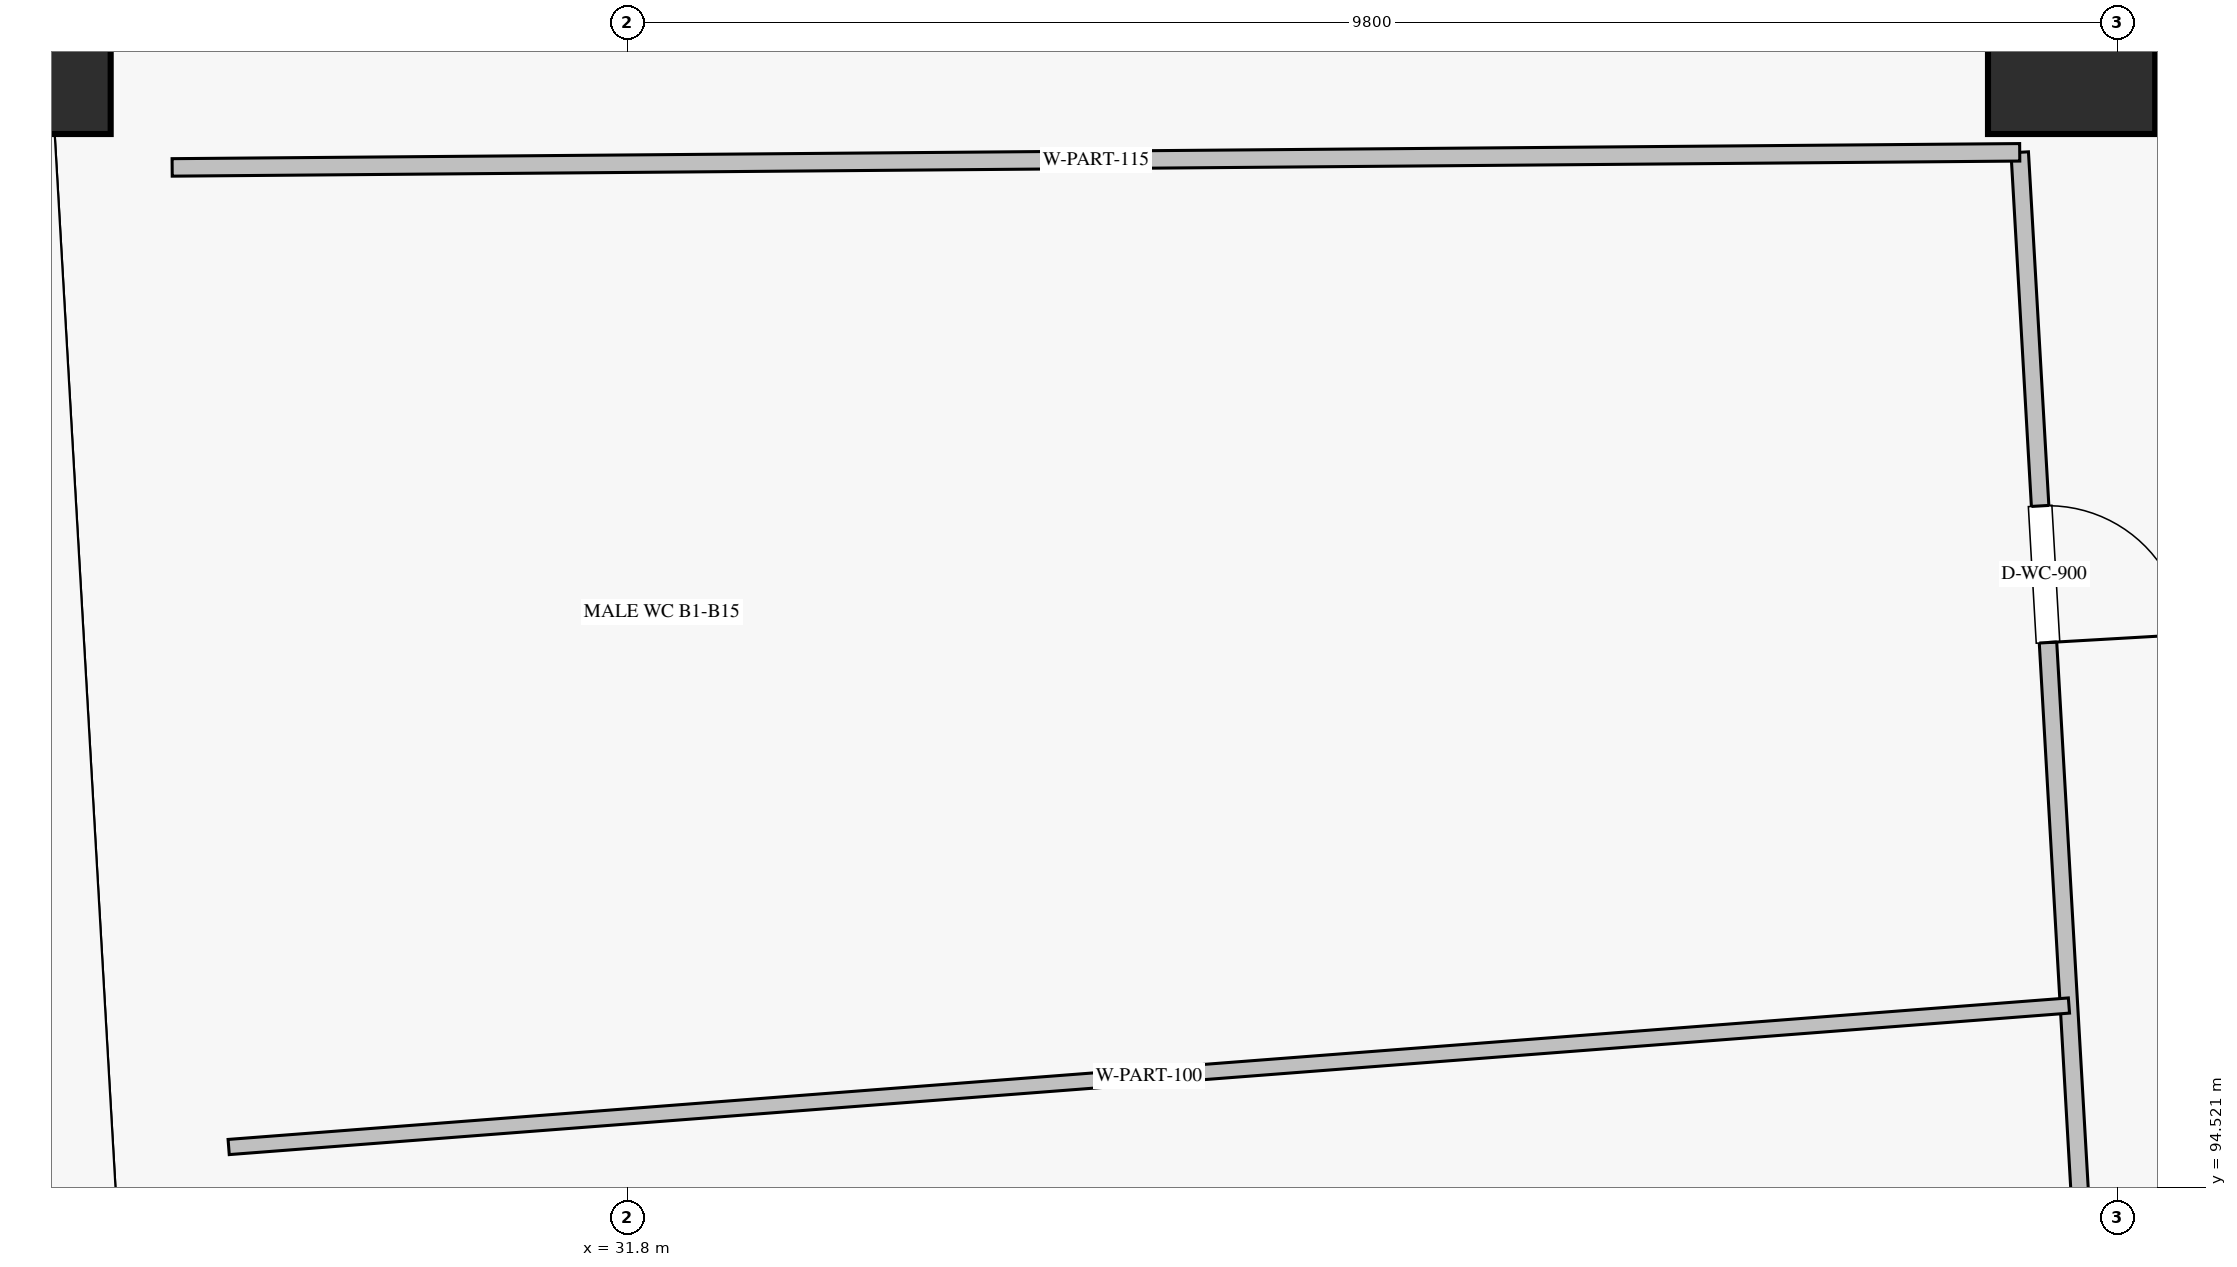
"""IFC4 building model, lengths in metres.
Left out: names, types, materials, properties, quantities, classifications, styles, units other than length and angle.
Written with IfcOpenShell. Run it as: python <this file> out.ifc"""

import sys

from ifc_helpers import new_model, si_unit, direction, frame, frame_2d, origin, origin_2d, place, context, subcontext, project, spatial, rectangle, extrude, element, fill, save


model = new_model("IFC4")
c1 = context("Model", 3, precision=1e-05, world=origin(), true_north=direction((0.0, 1.0)))
c2 = subcontext(c1, "Body", "Model", "MODEL_VIEW")
j1 = project(units=[si_unit("LENGTHUNIT", "METRE"), si_unit("PLANEANGLEUNIT", "RADIAN")], contexts=[c1])
p1 = place(None, origin())
s1 = spatial("IfcSite", under=j1, at=p1, CompositionType="ELEMENT")
p2 = place(p1, origin())
s2 = spatial("IfcBuilding", under=s1, at=p2, CompositionType="ELEMENT")
p3 = place(p2, frame((0.0, 0.0, -5.44)))
s3 = spatial("IfcBuildingStorey", under=s2, at=p3, CompositionType="ELEMENT", Elevation=-5.44)
p4 = place(p3, frame((41.3, 102.0, 0.0), z_axis=(0.0, 0.0, 1.0), x_axis=(-1.0, 0.0, 0.0)))
e1 = element("IfcColumn", 1, at=p4, inside=s3, PredefinedType="COLUMN", context=c2, shape_type="SweptSolid", body=[
    extrude(rectangle(XDim=1.1, YDim=1.1, at=origin_2d()), origin(), (0.0, 0.0, 1.0), 5.44),
])
p5 = place(p3, frame((28.0, 102.0, 0.0), z_axis=(0.0, 0.0, 1.0), x_axis=(-1.0, 0.0, 0.0)))
e2 = element("IfcColumn", 2, at=p5, inside=s3, PredefinedType="COLUMN", context=c2, shape_type="SweptSolid", body=[
    extrude(rectangle(XDim=0.8, YDim=1.1, at=origin_2d()), origin(), (0.0, 0.0, 1.0), 5.44),
])
p6 = place(p3, frame((40.959, 101.33, 0.0), z_axis=(0.0, 0.0, 1.0), x_axis=(0.057603503798, -0.998339539611, 0.0)))
e3 = element("IfcWall", 3, at=p6, inside=s3, PredefinedType="PARTITIONING", context=c2, shape_type="SweptSolid", body=[
    extrude(rectangle(XDim=15.444, YDim=0.115, at=frame_2d((7.722, 0.0))), origin(), (0.0, 0.0, 1.0), 4.46),
])
p7 = place(p6, frame((2.33, 0.0, 0.0)))
e4 = element("IfcOpeningElement", 4, at=p7, cuts=e3, PredefinedType="OPENING", context=c2, shape_type="SweptSolid", body=[
    extrude(rectangle(XDim=0.9, YDim=2.1, at=frame_2d((0.45, 1.05))), frame((0.0, 0.067, 0.0), z_axis=(0.0, -1.0, 0.0), x_axis=(1.0, 0.0, 0.0)), (0.0, 0.0, 1.0), 0.135),
])
p8 = place(p6, frame((7.89, 0.0, 0.0)))
e5 = element("IfcOpeningElement", 5, at=p8, cuts=e3, PredefinedType="OPENING", context=c2, shape_type="SweptSolid", body=[
    extrude(rectangle(XDim=0.9, YDim=2.1, at=frame_2d((0.45, 1.05))), frame((0.0, 0.067, 0.0), z_axis=(0.0, -1.0, 0.0), x_axis=(1.0, 0.0, 0.0)), (0.0, 0.0, 1.0), 0.135),
])
p9 = place(p6, frame((12.757, 0.0, 0.0)))
e6 = element("IfcOpeningElement", 6, at=p9, cuts=e3, PredefinedType="OPENING", context=c2, shape_type="SweptSolid", body=[
    extrude(rectangle(XDim=1.05, YDim=2.1, at=frame_2d((0.525, 1.05))), frame((0.0, 0.067, 0.0), z_axis=(0.0, -1.0, 0.0), x_axis=(1.0, 0.0, 0.0)), (0.0, 0.0, 1.0), 0.135),
])
p10 = place(p3, frame((40.959, 101.33, 0.0), z_axis=(0.0, 0.0, 1.0), x_axis=(-0.999966583768, -0.008175044183, 0.0)))
e7 = element("IfcWall", 7, at=p10, inside=s3, PredefinedType="PARTITIONING", context=c2, shape_type="SweptSolid", body=[
    extrude(rectangle(XDim=12.155, YDim=0.115, at=frame_2d((6.077, 0.0))), origin(), (0.0, 0.0, 1.0), 4.46),
])
p11 = place(p3, frame((41.282, 95.717, 0.0), z_axis=(0.0, 0.0, 1.0), x_axis=(-0.997058150978, -0.076648832789, 0.0)))
e8 = element("IfcWall", 8, at=p11, inside=s3, PredefinedType="PARTITIONING", context=c2, shape_type="SweptSolid", body=[
    extrude(rectangle(XDim=12.142, YDim=0.1, at=frame_2d((6.071, 0.0))), origin(), (0.0, 0.0, 1.0), 4.46),
])
p12 = place(p7, origin())
e9 = element("IfcDoor", 9, at=p12, inside=s3, OperationType="SINGLE_SWING_RIGHT", PredefinedType="DOOR", context=c2, shape_type="SweptSolid", body=[
    extrude(rectangle(XDim=0.9, YDim=2.1, at=frame_2d((0.45, 1.05))), frame((0.0, 0.025, 0.0), z_axis=(0.0, -1.0, 0.0), x_axis=(1.0, 0.0, 0.0)), (0.0, 0.0, 1.0), 0.05),
])
fill(e4, e9)
save(model, sys.argv[1])
